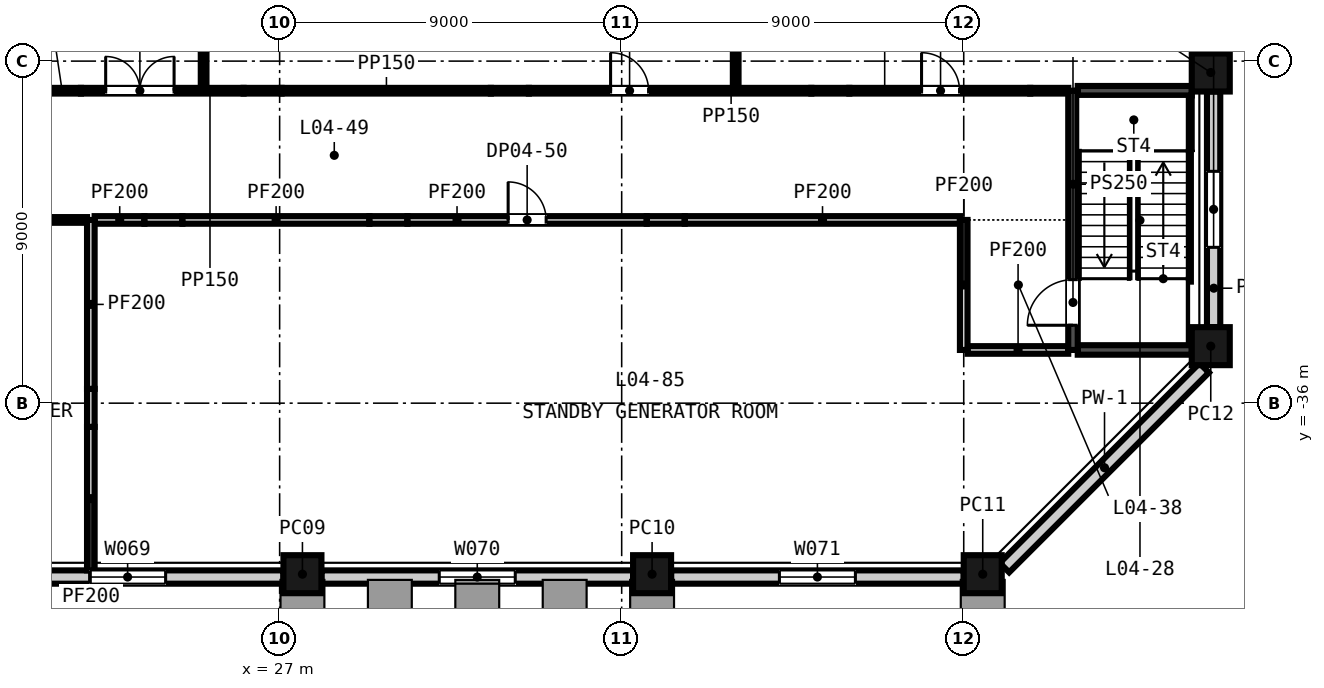
"""IFC4 building model, lengths in metres.
Left out: names, types, materials, properties, quantities, classifications, styles, units other than length and angle.
Written with IfcOpenShell. Run it as: python <this file> out.ifc"""

import sys

from ifc_helpers import new_model, si_unit, direction, frame, frame_2d, origin, origin_2d, place, context, subcontext, project, spatial, rectangle, extrude, element, fill, save


model = new_model("IFC4")
c1 = context("Model", 3, precision=1e-05, world=origin(), true_north=direction((0.0, 1.0)))
c2 = subcontext(c1, "Body", "Model", "MODEL_VIEW")
j1 = project(units=[si_unit("LENGTHUNIT", "METRE"), si_unit("PLANEANGLEUNIT", "RADIAN")], contexts=[c1])
p1 = place(None, origin())
s1 = spatial("IfcSite", under=j1, at=p1, CompositionType="ELEMENT")
p2 = place(p1, origin())
s2 = spatial("IfcBuilding", under=s1, at=p2, CompositionType="ELEMENT")
p3 = place(p2, frame((0.0, 0.0, 27.0)))
s3 = spatial("IfcBuildingStorey", under=s2, at=p3, CompositionType="ELEMENT", Elevation=27.0)
for number, where, z_axis, x_axis in (
    (1, (27.6, -40.5, -0.3), (0.0, 0.0, 1.0), (1.0, 0.0, 0.0)),
    (2, (36.8, -40.5, -0.3), (0.0, 0.0, 1.0), (1.0, 0.0, 0.0)),
    (3, (45.5, -40.5, -0.3), (0.0, 0.0, 1.0), (1.0, 0.0, 0.0)),
    (4, (51.5, -34.5, -0.3), (0.0, 0.0, 1.0), (0.0, 1.0, 0.0)),
    (5, (51.5, -27.3, -0.3), (0.0, 0.0, 1.0), (0.0, 1.0, 0.0)),
):
    element("IfcColumn", number, at=place(p3, frame(where, z_axis=z_axis, x_axis=x_axis)), inside=s3, PredefinedType="COLUMN", context=c2, shape_type="SweptSolid", body=[
        extrude(rectangle(XDim=1.0, YDim=1.0, at=origin_2d()), origin(), (0.0, 0.0, 1.0), 4.5),
    ])
p4 = place(p3, frame((18.9, -40.575, -0.3), z_axis=(0.0, 0.0, 1.0), x_axis=(1.0, 0.0, 0.0)))
e6 = element("IfcWall", 6, at=p4, inside=s3, PredefinedType="SOLIDWALL", context=c2, shape_type="SweptSolid", body=[
    extrude(rectangle(XDim=8.2, YDim=0.35, at=frame_2d((4.1, 0.0))), origin(), (0.0, 0.0, 1.0), 3.6),
])
p5 = place(p4, frame((3.1, 0.0, 1.2)))
e7 = element("IfcOpeningElement", 7, at=p5, cuts=e6, PredefinedType="OPENING", context=c2, shape_type="SweptSolid", body=[
    extrude(rectangle(XDim=2.0, YDim=2.35, at=frame_2d((1.0, 1.175))), frame((0.0, 0.185, 0.0), z_axis=(0.0, -1.0, 0.0), x_axis=(1.0, 0.0, 0.0)), (0.0, 0.0, 1.0), 0.37),
])
p6 = place(p3, frame((28.1, -40.575, -0.3), z_axis=(0.0, 0.0, 1.0), x_axis=(1.0, 0.0, 0.0)))
e8 = element("IfcWall", 8, at=p6, inside=s3, PredefinedType="SOLIDWALL", context=c2, shape_type="SweptSolid", body=[
    extrude(rectangle(XDim=8.2, YDim=0.35, at=frame_2d((4.1, 0.0))), origin(), (0.0, 0.0, 1.0), 3.6),
])
p7 = place(p6, frame((3.1, 0.0, 1.2)))
e9 = element("IfcOpeningElement", 9, at=p7, cuts=e8, PredefinedType="OPENING", context=c2, shape_type="SweptSolid", body=[
    extrude(rectangle(XDim=2.0, YDim=2.35, at=frame_2d((1.0, 1.175))), frame((0.0, 0.185, 0.0), z_axis=(0.0, -1.0, 0.0), x_axis=(1.0, 0.0, 0.0)), (0.0, 0.0, 1.0), 0.37),
])
p8 = place(p3, frame((37.3, -40.575, -0.3), z_axis=(0.0, 0.0, 1.0), x_axis=(1.0, 0.0, 0.0)))
e10 = element("IfcWall", 10, at=p8, inside=s3, PredefinedType="SOLIDWALL", context=c2, shape_type="SweptSolid", body=[
    extrude(rectangle(XDim=7.7, YDim=0.35, at=frame_2d((3.85, 0.0))), origin(), (0.0, 0.0, 1.0), 3.6),
])
p9 = place(p8, frame((2.85, 0.0, 1.2)))
e11 = element("IfcOpeningElement", 11, at=p9, cuts=e10, PredefinedType="OPENING", context=c2, shape_type="SweptSolid", body=[
    extrude(rectangle(XDim=2.0, YDim=2.35, at=frame_2d((1.0, 1.175))), frame((0.0, 0.185, 0.0), z_axis=(0.0, -1.0, 0.0), x_axis=(1.0, 0.0, 0.0)), (0.0, 0.0, 1.0), 0.37),
])
p10 = place(p3, frame((46.072, -40.327, -0.3), z_axis=(0.0, 0.0, 1.0), x_axis=(0.707106781187, 0.707106781187, 0.0)))
e12 = element("IfcWall", 12, at=p10, inside=s3, PredefinedType="SOLIDWALL", context=c2, shape_type="SweptSolid", body=[
    extrude(rectangle(XDim=7.433, YDim=0.35, at=frame_2d((3.716, 0.0))), origin(), (0.0, 0.0, 1.0), 3.6),
])
p11 = place(p3, frame((51.575, -34.0, -0.3), z_axis=(0.0, 0.0, 1.0), x_axis=(0.0, 1.0, 0.0)))
e13 = element("IfcWall", 13, at=p11, inside=s3, PredefinedType="SOLIDWALL", context=c2, shape_type="SweptSolid", body=[
    extrude(rectangle(XDim=6.2, YDim=0.35, at=frame_2d((3.1, 0.0))), origin(), (0.0, 0.0, 1.0), 3.6),
])
p12 = place(p11, frame((2.1, 0.0, 1.2)))
e14 = element("IfcOpeningElement", 14, at=p12, cuts=e13, PredefinedType="OPENING", context=c2, shape_type="SweptSolid", body=[
    extrude(rectangle(XDim=2.0, YDim=2.35, at=frame_2d((1.0, 1.175))), frame((0.0, 0.185, 0.0), z_axis=(0.0, -1.0, 0.0), x_axis=(1.0, 0.0, 0.0)), (0.0, 0.0, 1.0), 0.37),
])
p13 = place(p3, frame((45.1, -34.6, 0.0), z_axis=(0.0, 0.0, 1.0), x_axis=(1.0, 0.0, 0.0)))
e15 = element("IfcWall", 15, at=p13, inside=s3, PredefinedType="PARTITIONING", context=c2, shape_type="SweptSolid", body=[
    extrude(rectangle(XDim=2.65, YDim=0.2, at=frame_2d((1.325, 0.0))), origin(), (0.0, 0.0, 1.0), 4.2),
])
p14 = place(p3, frame((48.0, -34.6, 0.0), z_axis=(0.0, 0.0, 1.0), x_axis=(1.0, 0.0, 0.0)))
e16 = element("IfcWall", 16, at=p14, inside=s3, PredefinedType="SHEAR", context=c2, shape_type="SweptSolid", body=[
    extrude(rectangle(XDim=3.0, YDim=0.25, at=frame_2d((1.5, 0.0))), origin(), (0.0, 0.0, 1.0), 4.2),
])
p15 = place(p3, frame((17.814, -31.179, 0.0), z_axis=(0.0, 0.0, 1.0), x_axis=(1.0, 0.0, 0.0)))
e17 = element("IfcWall", 17, at=p15, inside=s3, PredefinedType="PARTITIONING", context=c2, shape_type="SweptSolid", body=[
    extrude(rectangle(XDim=4.118, YDim=0.15, at=frame_2d((2.059, 0.0))), origin(), (0.0, 0.0, 1.0), 4.2),
])
p16 = place(p15, frame((1.65, 0.0, 0.0)))
e18 = element("IfcOpeningElement", 18, at=p16, cuts=e17, PredefinedType="OPENING", context=c2, shape_type="SweptSolid", body=[
    extrude(rectangle(XDim=1.0, YDim=2.1, at=frame_2d((0.5, 1.05))), frame((0.0, 0.085, 0.0), z_axis=(0.0, -1.0, 0.0), x_axis=(1.0, 0.0, 0.0)), (0.0, 0.0, 1.0), 0.17),
])
p17 = place(p3, frame((22.132, -31.179, 0.0), z_axis=(0.0, 0.0, 1.0), x_axis=(1.0, 0.0, 0.0)))
e19 = element("IfcWall", 19, at=p17, inside=s3, PredefinedType="PARTITIONING", context=c2, shape_type="SweptSolid", body=[
    extrude(rectangle(XDim=1.31, YDim=0.2, at=frame_2d((0.655, 0.0))), origin(), (0.0, 0.0, 1.0), 4.2),
])
p18 = place(p3, frame((23.442, -31.179, 0.0), z_axis=(0.0, 0.0, 1.0), x_axis=(1.0, 0.0, 0.0)))
e20 = element("IfcWall", 20, at=p18, inside=s3, PredefinedType="PARTITIONING", context=c2, shape_type="SweptSolid", body=[
    extrude(rectangle(XDim=1.0, YDim=0.2, at=frame_2d((0.5, 0.0))), origin(), (0.0, 0.0, 1.0), 3.298),
])
p19 = place(p3, frame((24.442, -31.179, 0.0), z_axis=(0.0, 0.0, 1.0), x_axis=(1.0, 0.0, 0.0)))
e21 = element("IfcWall", 21, at=p19, inside=s3, PredefinedType="PARTITIONING", context=c2, shape_type="SweptSolid", body=[
    extrude(rectangle(XDim=4.921, YDim=0.2, at=frame_2d((2.46, 0.0))), origin(), (0.0, 0.0, 1.0), 4.2),
])
p20 = place(p3, frame((29.363, -31.179, 0.0), z_axis=(0.0, 0.0, 1.0), x_axis=(1.0, 0.0, 0.0)))
e22 = element("IfcWall", 22, at=p20, inside=s3, PredefinedType="PARTITIONING", context=c2, shape_type="SweptSolid", body=[
    extrude(rectangle(XDim=1.0, YDim=0.2, at=frame_2d((0.5, 0.0))), origin(), (0.0, 0.0, 1.0), 3.219),
])
p21 = place(p3, frame((30.363, -31.179, 0.0), z_axis=(0.0, 0.0, 1.0), x_axis=(1.0, 0.0, 0.0)))
e23 = element("IfcWall", 23, at=p21, inside=s3, PredefinedType="PARTITIONING", context=c2, shape_type="SweptSolid", body=[
    extrude(rectangle(XDim=6.297, YDim=0.2, at=frame_2d((3.148, 0.0))), origin(), (0.0, 0.0, 1.0), 4.2),
])
p22 = place(p21, frame((2.65, 0.0, 0.0)))
e24 = element("IfcOpeningElement", 24, at=p22, cuts=e23, PredefinedType="OPENING", context=c2, shape_type="SweptSolid", body=[
    extrude(rectangle(XDim=1.0, YDim=2.1, at=frame_2d((0.5, 1.05))), frame((0.0, 0.11, 0.0), z_axis=(0.0, -1.0, 0.0), x_axis=(1.0, 0.0, 0.0)), (0.0, 0.0, 1.0), 0.22),
])
p23 = place(p3, frame((36.659, -31.179, 0.0), z_axis=(0.0, 0.0, 1.0), x_axis=(1.0, 0.0, 0.0)))
e25 = element("IfcWall", 25, at=p23, inside=s3, PredefinedType="PARTITIONING", context=c2, shape_type="SweptSolid", body=[
    extrude(rectangle(XDim=1.0, YDim=0.2, at=frame_2d((0.5, 0.0))), origin(), (0.0, 0.0, 1.0), 3.111),
])
p24 = place(p3, frame((37.659, -31.179, 0.0), z_axis=(0.0, 0.0, 1.0), x_axis=(1.0, 0.0, 0.0)))
e26 = element("IfcWall", 26, at=p24, inside=s3, PredefinedType="PARTITIONING", context=c2, shape_type="SweptSolid", body=[
    extrude(rectangle(XDim=7.241, YDim=0.2, at=frame_2d((3.62, 0.0))), origin(), (0.0, 0.0, 1.0), 4.2),
])
p25 = place(p3, frame((20.773, -27.779, 0.0), z_axis=(0.0, 0.0, 1.0), x_axis=(1.0, 0.0, 0.0)))
e27 = element("IfcWall", 27, at=p25, inside=s3, PredefinedType="PARTITIONING", context=c2, shape_type="SweptSolid", body=[
    extrude(rectangle(XDim=1.0, YDim=0.15, at=frame_2d((0.5, 0.0))), origin(), (0.0, 0.0, 1.0), 3.298),
])
p26 = place(p3, frame((21.773, -27.779, 0.0), z_axis=(0.0, 0.0, 1.0), x_axis=(1.0, 0.0, 0.0)))
e28 = element("IfcWall", 28, at=p26, inside=s3, PredefinedType="PARTITIONING", context=c2, shape_type="SweptSolid", body=[
    extrude(rectangle(XDim=4.279, YDim=0.15, at=frame_2d((2.14, 0.0))), origin(), (0.0, 0.0, 1.0), 4.2),
])
p27 = place(p26, frame((0.65, 0.0, 0.0)))
e29 = element("IfcOpeningElement", 29, at=p27, cuts=e28, PredefinedType="OPENING", context=c2, shape_type="SweptSolid", body=[
    extrude(rectangle(XDim=1.8, YDim=2.4, at=frame_2d((0.9, 1.2))), frame((0.0, 0.085, 0.0), z_axis=(0.0, -1.0, 0.0), x_axis=(1.0, 0.0, 0.0)), (0.0, 0.0, 1.0), 0.17),
])
p28 = place(p3, frame((26.052, -27.779, 0.0), z_axis=(0.0, 0.0, 1.0), x_axis=(1.0, 0.0, 0.0)))
e30 = element("IfcWall", 30, at=p28, inside=s3, PredefinedType="PARTITIONING", context=c2, shape_type="SweptSolid", body=[
    extrude(rectangle(XDim=1.0, YDim=0.15, at=frame_2d((0.5, 0.0))), origin(), (0.0, 0.0, 1.0), 3.219),
])
p29 = place(p3, frame((27.052, -27.779, 0.0), z_axis=(0.0, 0.0, 1.0), x_axis=(1.0, 0.0, 0.0)))
e31 = element("IfcWall", 31, at=p29, inside=s3, PredefinedType="PARTITIONING", context=c2, shape_type="SweptSolid", body=[
    extrude(rectangle(XDim=5.506, YDim=0.15, at=frame_2d((2.753, 0.0))), origin(), (0.0, 0.0, 1.0), 4.2),
])
p30 = place(p3, frame((32.558, -27.779, 0.0), z_axis=(0.0, 0.0, 1.0), x_axis=(1.0, 0.0, 0.0)))
e32 = element("IfcWall", 32, at=p30, inside=s3, PredefinedType="PARTITIONING", context=c2, shape_type="SweptSolid", body=[
    extrude(rectangle(XDim=1.0, YDim=0.15, at=frame_2d((0.5, 0.0))), origin(), (0.0, 0.0, 1.0), 3.111),
])
p31 = place(p3, frame((33.558, -27.779, 0.0), z_axis=(0.0, 0.0, 1.0), x_axis=(1.0, 0.0, 0.0)))
e33 = element("IfcWall", 33, at=p31, inside=s3, PredefinedType="PARTITIONING", context=c2, shape_type="SweptSolid", body=[
    extrude(rectangle(XDim=7.432, YDim=0.15, at=frame_2d((3.716, 0.0))), origin(), (0.0, 0.0, 1.0), 4.2),
])
p32 = place(p31, frame((2.15, 0.0, 0.0)))
e34 = element("IfcOpeningElement", 34, at=p32, cuts=e33, PredefinedType="OPENING", context=c2, shape_type="SweptSolid", body=[
    extrude(rectangle(XDim=1.0, YDim=2.1, at=frame_2d((0.5, 1.05))), frame((0.0, 0.085, 0.0), z_axis=(0.0, -1.0, 0.0), x_axis=(1.0, 0.0, 0.0)), (0.0, 0.0, 1.0), 0.17),
])
p33 = place(p3, frame((40.99, -27.779, 0.0), z_axis=(0.0, 0.0, 1.0), x_axis=(1.0, 0.0, 0.0)))
e35 = element("IfcWall", 35, at=p33, inside=s3, PredefinedType="PARTITIONING", context=c2, shape_type="SweptSolid", body=[
    extrude(rectangle(XDim=1.0, YDim=0.15, at=frame_2d((0.5, 0.0))), origin(), (0.0, 0.0, 1.0), 3.111),
])
p34 = place(p3, frame((41.99, -27.779, 0.0), z_axis=(0.0, 0.0, 1.0), x_axis=(1.0, 0.0, 0.0)))
e36 = element("IfcWall", 36, at=p34, inside=s3, PredefinedType="PARTITIONING", context=c2, shape_type="SweptSolid", body=[
    extrude(rectangle(XDim=4.76, YDim=0.15, at=frame_2d((2.38, 0.0))), origin(), (0.0, 0.0, 1.0), 4.2),
])
p35 = place(p34, frame((1.9, 0.0, 0.0)))
e37 = element("IfcOpeningElement", 37, at=p35, cuts=e36, PredefinedType="OPENING", context=c2, shape_type="SweptSolid", body=[
    extrude(rectangle(XDim=1.0, YDim=2.1, at=frame_2d((0.5, 1.05))), frame((0.0, 0.085, 0.0), z_axis=(0.0, -1.0, 0.0), x_axis=(1.0, 0.0, 0.0)), (0.0, 0.0, 1.0), 0.17),
])
p36 = place(p3, frame((46.75, -27.779, 0.0), z_axis=(0.0, 0.0, 1.0), x_axis=(1.0, 0.0, 0.0)))
e38 = element("IfcWall", 38, at=p36, inside=s3, PredefinedType="PARTITIONING", context=c2, shape_type="SweptSolid", body=[
    extrude(rectangle(XDim=1.0, YDim=0.15, at=frame_2d((0.5, 0.0))), origin(), (0.0, 0.0, 1.0), 3.667),
])
p37 = place(p3, frame((48.0, -27.779, 0.0), z_axis=(0.0, 0.0, 1.0), x_axis=(1.0, 0.0, 0.0)))
e39 = element("IfcWall", 39, at=p37, inside=s3, PredefinedType="SHEAR", context=c2, shape_type="SweptSolid", body=[
    extrude(rectangle(XDim=3.0, YDim=0.25, at=frame_2d((1.5, 0.0))), origin(), (0.0, 0.0, 1.0), 4.2),
])
p38 = place(p3, frame((22.032, -40.4, 0.0), z_axis=(0.0, 0.0, 1.0), x_axis=(0.0, 1.0, 0.0)))
e40 = element("IfcWall", 40, at=p38, inside=s3, PredefinedType="PARTITIONING", context=c2, shape_type="SweptSolid", body=[
    extrude(rectangle(XDim=3.776, YDim=0.2, at=frame_2d((1.888, 0.0))), origin(), (0.0, 0.0, 1.0), 4.2),
])
p39 = place(p3, frame((22.032, -36.624, 0.0), z_axis=(0.0, 0.0, 1.0), x_axis=(0.0, 1.0, 0.0)))
e41 = element("IfcWall", 41, at=p39, inside=s3, PredefinedType="PARTITIONING", context=c2, shape_type="SweptSolid", body=[
    extrude(rectangle(XDim=1.0, YDim=0.2, at=frame_2d((0.5, 0.0))), origin(), (0.0, 0.0, 1.0), 3.451),
])
p40 = place(p3, frame((22.032, -35.624, 0.0), z_axis=(0.0, 0.0, 1.0), x_axis=(0.0, 1.0, 0.0)))
e42 = element("IfcWall", 42, at=p40, inside=s3, PredefinedType="PARTITIONING", context=c2, shape_type="SweptSolid", body=[
    extrude(rectangle(XDim=4.445, YDim=0.2, at=frame_2d((2.222, 0.0))), origin(), (0.0, 0.0, 1.0), 4.2),
])
p41 = place(p3, frame((25.0, -27.704, 0.0), z_axis=(0.0, 0.0, 1.0), x_axis=(0.0, 1.0, 0.0)))
e43 = element("IfcWall", 43, at=p41, inside=s3, PredefinedType="PARTITIONING", context=c2, shape_type="SweptSolid", body=[
    extrude(rectangle(XDim=1.019, YDim=0.15, at=frame_2d((0.509, 0.0))), origin(), (0.0, 0.0, 1.0), 4.2),
])
p42 = place(p3, frame((39.0, -27.704, 0.0), z_axis=(0.0, 0.0, 1.0), x_axis=(0.0, 1.0, 0.0)))
e44 = element("IfcWall", 44, at=p42, inside=s3, PredefinedType="PARTITIONING", context=c2, shape_type="SweptSolid", body=[
    extrude(rectangle(XDim=1.077, YDim=0.15, at=frame_2d((0.539, 0.0))), origin(), (0.0, 0.0, 1.0), 4.2),
])
p43 = place(p3, frame((45.0, -34.6, 0.0), z_axis=(0.0, 0.0, 1.0), x_axis=(0.0, 1.0, 0.0)))
e45 = element("IfcWall", 45, at=p43, inside=s3, PredefinedType="PARTITIONING", context=c2, shape_type="SweptSolid", body=[
    extrude(rectangle(XDim=3.421, YDim=0.2, at=frame_2d((1.71, 0.0))), origin(), (0.0, 0.0, 1.0), 4.2),
])
p44 = place(p3, frame((47.875, -34.6, 0.0), z_axis=(0.0, 0.0, 1.0), x_axis=(0.0, 1.0, 0.0)))
e46 = element("IfcWall", 46, at=p44, inside=s3, PredefinedType="SHEAR", context=c2, shape_type="SweptSolid", body=[
    extrude(rectangle(XDim=6.821, YDim=0.25, at=frame_2d((3.411, 0.0))), origin(), (0.0, 0.0, 1.0), 4.2),
])
p45 = place(p44, frame((0.65, 0.0, 0.0)))
e47 = element("IfcOpeningElement", 47, at=p45, cuts=e46, PredefinedType="OPENING", context=c2, shape_type="SweptSolid", body=[
    extrude(rectangle(XDim=1.2, YDim=2.1, at=frame_2d((0.6, 1.05))), frame((0.0, 0.135, 0.0), z_axis=(0.0, -1.0, 0.0), x_axis=(1.0, 0.0, 0.0)), (0.0, 0.0, 1.0), 0.27),
])
p46 = place(p5, origin())
e48 = element("IfcWindow", 48, at=p46, inside=s3, PartitioningType="SINGLE_PANEL", PredefinedType="WINDOW", context=c2, shape_type="SweptSolid", body=[
    extrude(rectangle(XDim=2.0, YDim=2.35, at=frame_2d((1.0, 1.175))), frame((0.0, 0.03, 0.0), z_axis=(0.0, -1.0, 0.0), x_axis=(1.0, 0.0, 0.0)), (0.0, 0.0, 1.0), 0.06),
])
fill(e7, e48)
p47 = place(p7, origin())
e49 = element("IfcWindow", 49, at=p47, inside=s3, PartitioningType="SINGLE_PANEL", PredefinedType="WINDOW", context=c2, shape_type="SweptSolid", body=[
    extrude(rectangle(XDim=2.0, YDim=2.35, at=frame_2d((1.0, 1.175))), frame((0.0, 0.03, 0.0), z_axis=(0.0, -1.0, 0.0), x_axis=(1.0, 0.0, 0.0)), (0.0, 0.0, 1.0), 0.06),
])
fill(e9, e49)
p48 = place(p9, origin())
e50 = element("IfcWindow", 50, at=p48, inside=s3, PartitioningType="SINGLE_PANEL", PredefinedType="WINDOW", context=c2, shape_type="SweptSolid", body=[
    extrude(rectangle(XDim=2.0, YDim=2.35, at=frame_2d((1.0, 1.175))), frame((0.0, 0.03, 0.0), z_axis=(0.0, -1.0, 0.0), x_axis=(1.0, 0.0, 0.0)), (0.0, 0.0, 1.0), 0.06),
])
fill(e11, e50)
p49 = place(p12, origin())
e51 = element("IfcWindow", 51, at=p49, inside=s3, PartitioningType="SINGLE_PANEL", PredefinedType="WINDOW", context=c2, shape_type="SweptSolid", body=[
    extrude(rectangle(XDim=2.0, YDim=2.35, at=frame_2d((1.0, 1.175))), frame((0.0, 0.03, 0.0), z_axis=(0.0, -1.0, 0.0), x_axis=(1.0, 0.0, 0.0)), (0.0, 0.0, 1.0), 0.06),
])
fill(e14, e51)
p50 = place(p45, origin())
e52 = element("IfcDoor", 52, at=p50, inside=s3, OperationType="SINGLE_SWING_LEFT", PredefinedType="DOOR", context=c2, shape_type="SweptSolid", body=[
    extrude(rectangle(XDim=1.2, YDim=2.1, at=frame_2d((0.6, 1.05))), frame((0.0, 0.025, 0.0), z_axis=(0.0, -1.0, 0.0), x_axis=(1.0, 0.0, 0.0)), (0.0, 0.0, 1.0), 0.05),
])
fill(e47, e52)
p51 = place(p27, origin())
e53 = element("IfcDoor", 53, at=p51, inside=s3, OperationType="SINGLE_SWING_LEFT", PredefinedType="DOOR", context=c2, shape_type="SweptSolid", body=[
    extrude(rectangle(XDim=1.8, YDim=2.4, at=frame_2d((0.9, 1.2))), frame((0.0, 0.025, 0.0), z_axis=(0.0, -1.0, 0.0), x_axis=(1.0, 0.0, 0.0)), (0.0, 0.0, 1.0), 0.05),
])
fill(e29, e53)
p52 = place(p32, origin())
e54 = element("IfcDoor", 54, at=p52, inside=s3, OperationType="SINGLE_SWING_LEFT", PredefinedType="DOOR", context=c2, shape_type="SweptSolid", body=[
    extrude(rectangle(XDim=1.0, YDim=2.1, at=frame_2d((0.5, 1.05))), frame((0.0, 0.025, 0.0), z_axis=(0.0, -1.0, 0.0), x_axis=(1.0, 0.0, 0.0)), (0.0, 0.0, 1.0), 0.05),
])
fill(e34, e54)
p53 = place(p35, origin())
e55 = element("IfcDoor", 55, at=p53, inside=s3, OperationType="SINGLE_SWING_LEFT", PredefinedType="DOOR", context=c2, shape_type="SweptSolid", body=[
    extrude(rectangle(XDim=1.0, YDim=2.1, at=frame_2d((0.5, 1.05))), frame((0.0, 0.025, 0.0), z_axis=(0.0, -1.0, 0.0), x_axis=(1.0, 0.0, 0.0)), (0.0, 0.0, 1.0), 0.05),
])
fill(e37, e55)
p54 = place(p22, origin())
e56 = element("IfcDoor", 56, at=p54, inside=s3, OperationType="SINGLE_SWING_LEFT", PredefinedType="DOOR", context=c2, shape_type="SweptSolid", body=[
    extrude(rectangle(XDim=1.0, YDim=2.1, at=frame_2d((0.5, 1.05))), frame((0.0, 0.025, 0.0), z_axis=(0.0, -1.0, 0.0), x_axis=(1.0, 0.0, 0.0)), (0.0, 0.0, 1.0), 0.05),
])
fill(e24, e56)
save(model, sys.argv[1])
